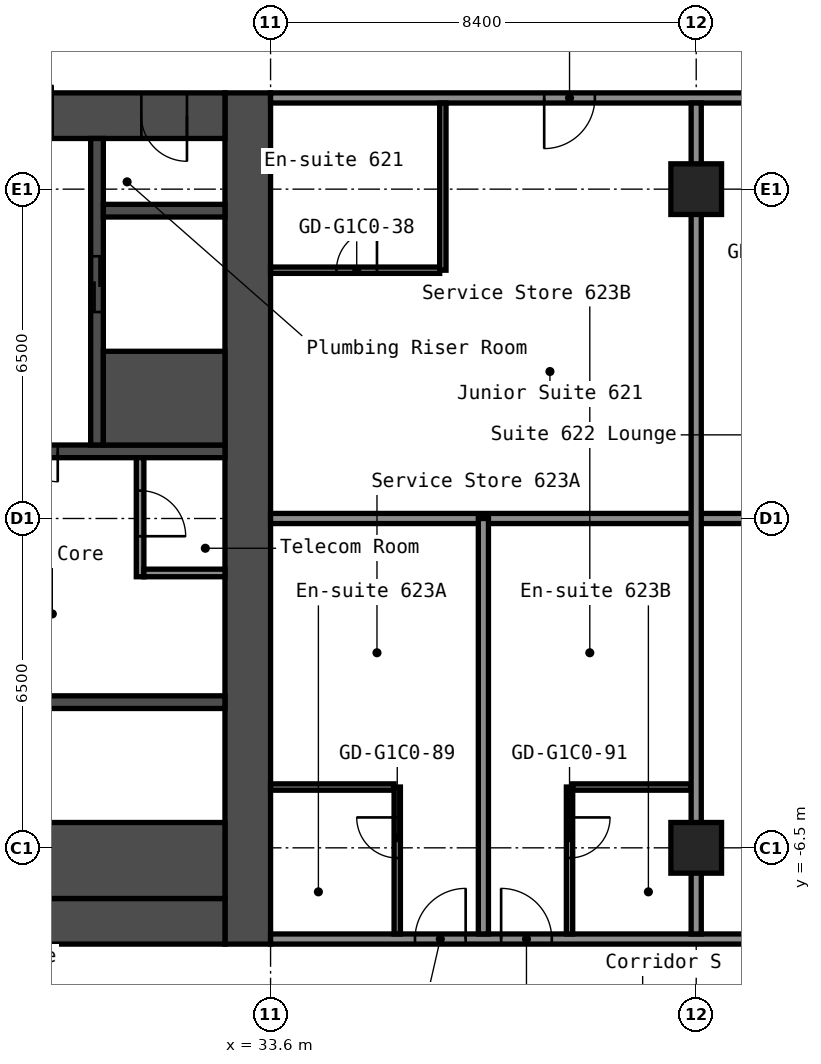
"""IFC4 building model, lengths in metres.
Left out: names, types, materials, properties, quantities, classifications, styles, units other than length and angle.
Written with IfcOpenShell. Run it as: python <this file> out.ifc"""

import sys

from ifc_helpers import new_model, si_unit, direction, frame, frame_2d, origin, origin_2d, place, context, subcontext, project, spatial, rectangle, hollow_rectangle, extrude, element, fill, save


model = new_model("IFC4")
c1 = context("Model", 3, precision=1e-05, world=origin(), true_north=direction((0.0, 1.0)))
c2 = subcontext(c1, "Body", "Model", "MODEL_VIEW")
j1 = project(units=[si_unit("LENGTHUNIT", "METRE"), si_unit("PLANEANGLEUNIT", "RADIAN")], contexts=[c1])
p1 = place(None, origin())
s1 = spatial("IfcSite", under=j1, at=p1, CompositionType="ELEMENT")
p2 = place(p1, origin())
s2 = spatial("IfcBuilding", under=s1, at=p2, CompositionType="ELEMENT")
p3 = place(p2, frame((0.0, 0.0, 26.2)))
s3 = spatial("IfcBuildingStorey", under=s2, at=p3, CompositionType="ELEMENT", Elevation=26.2)
for number, where, z_axis, x_axis in (
    (1, (42.0, -6.5, 0.0), (0.0, 0.0, 1.0), (1.0, 0.0, 0.0)),
    (2, (42.0, 6.5, 0.0), (0.0, 0.0, 1.0), (1.0, 0.0, 0.0)),
):
    element("IfcColumn", number, at=place(p3, frame(where, z_axis=z_axis, x_axis=x_axis)), inside=s3, PredefinedType="COLUMN", context=c2, shape_type="SweptSolid", body=[
        extrude(hollow_rectangle(XDim=1.0, YDim=1.0, WallThickness=0.04, at=origin_2d()), origin(), (0.0, 0.0, 1.0), 2.8),
    ])
p4 = place(p3, frame((33.15, -8.4, 0.0), z_axis=(0.0, 0.0, 1.0), x_axis=(0.0, 1.0, 0.0)))
e3 = element("IfcWall", 3, at=p4, inside=s3, PredefinedType="SHEAR", context=c2, shape_type="SweptSolid", body=[
    extrude(rectangle(XDim=16.8, YDim=0.9, at=frame_2d((8.4, 0.0))), origin(), (0.0, 0.0, 1.0), 2.8),
])
p5 = place(p3, frame((17.7, 7.95, 0.0), z_axis=(0.0, 0.0, 1.0), x_axis=(1.0, 0.0, 0.0)))
e4 = element("IfcWall", 4, at=p5, inside=s3, PredefinedType="SHEAR", context=c2, shape_type="SweptSolid", body=[
    extrude(rectangle(XDim=15.0, YDim=0.9, at=frame_2d((7.5, 0.0))), origin(), (0.0, 0.0, 1.0), 2.8),
])
p6 = place(p5, frame((10.4, 0.0, 0.0)))
e5 = element("IfcOpeningElement", 5, at=p6, cuts=e4, PredefinedType="OPENING", context=c2, shape_type="SweptSolid", body=[
    extrude(rectangle(XDim=1.2, YDim=2.1, at=frame_2d((0.6, 1.05))), frame((0.0, 0.46, 0.0), z_axis=(0.0, -1.0, 0.0), x_axis=(1.0, 0.0, 0.0)), (0.0, 0.0, 1.0), 0.92),
])
p7 = place(p5, frame((13.35, 0.0, 0.0)))
e6 = element("IfcOpeningElement", 6, at=p7, cuts=e4, PredefinedType="OPENING", context=c2, shape_type="SweptSolid", body=[
    extrude(rectangle(XDim=0.9, YDim=2.1, at=frame_2d((0.45, 1.05))), frame((0.0, 0.46, 0.0), z_axis=(0.0, -1.0, 0.0), x_axis=(1.0, 0.0, 0.0)), (0.0, 0.0, 1.0), 0.92),
])
p8 = place(p3, frame((17.7, -7.95, 0.0), z_axis=(0.0, 0.0, 1.0), x_axis=(1.0, 0.0, 0.0)))
e7 = element("IfcWall", 7, at=p8, inside=s3, PredefinedType="SHEAR", context=c2, shape_type="SweptSolid", body=[
    extrude(rectangle(XDim=15.0, YDim=0.9, at=frame_2d((7.5, 0.0))), origin(), (0.0, 0.0, 1.0), 2.8),
])
p9 = place(p8, frame((2.55, 0.0, 0.0)))
e8 = element("IfcOpeningElement", 8, at=p9, cuts=e7, PredefinedType="OPENING", context=c2, shape_type="SweptSolid", body=[
    extrude(rectangle(XDim=1.0, YDim=2.1, at=frame_2d((0.5, 1.05))), frame((0.0, 0.46, 0.0), z_axis=(0.0, -1.0, 0.0), x_axis=(1.0, 0.0, 0.0)), (0.0, 0.0, 1.0), 0.92),
])
p10 = place(p3, frame((27.65, 1.325, 0.0), z_axis=(0.0, 0.0, 1.0), x_axis=(1.0, 0.0, 0.0)))
e9 = element("IfcWall", 9, at=p10, inside=s3, PredefinedType="SHEAR", context=c2, shape_type="SweptSolid", body=[
    extrude(rectangle(XDim=5.05, YDim=0.25, at=frame_2d((2.525, 0.0))), origin(), (0.0, 0.0, 1.0), 2.8),
])
p11 = place(p10, frame((0.55, 0.0, 0.0)))
e10 = element("IfcOpeningElement", 10, at=p11, cuts=e9, PredefinedType="OPENING", context=c2, shape_type="SweptSolid", body=[
    extrude(rectangle(XDim=1.2, YDim=2.1, at=frame_2d((0.6, 1.05))), frame((0.0, 0.135, 0.0), z_axis=(0.0, -1.0, 0.0), x_axis=(1.0, 0.0, 0.0)), (0.0, 0.0, 1.0), 0.27),
])
p12 = place(p3, frame((30.175, 1.45, 0.0), z_axis=(0.0, 0.0, 1.0), x_axis=(0.0, 1.0, 0.0)))
e11 = element("IfcWall", 11, at=p12, inside=s3, PredefinedType="SHEAR", context=c2, shape_type="SweptSolid", body=[
    extrude(rectangle(XDim=6.05, YDim=0.25, at=frame_2d((3.025, 0.0))), origin(), (0.0, 0.0, 1.0), 2.8),
])
p13 = place(p12, frame((2.625, 0.0, 0.0)))
e12 = element("IfcOpeningElement", 12, at=p13, cuts=e11, PredefinedType="OPENING", context=c2, shape_type="SweptSolid", body=[
    extrude(rectangle(XDim=1.1, YDim=2.1, at=frame_2d((0.55, 1.05))), frame((0.0, 0.135, 0.0), z_axis=(0.0, -1.0, 0.0), x_axis=(1.0, 0.0, 0.0)), (0.0, 0.0, 1.0), 0.27),
])
p14 = place(p3, frame((30.3, 2.375, 0.0), z_axis=(0.0, 0.0, 1.0), x_axis=(1.0, 0.0, 0.0)))
e13 = element("IfcWall", 13, at=p14, inside=s3, PredefinedType="SHEAR", context=c2, shape_type="SweptSolid", body=[
    extrude(rectangle(XDim=2.4, YDim=1.85, at=frame_2d((1.2, 0.0))), origin(), (0.0, 0.0, 1.0), 2.8),
])
p15 = place(p3, frame((30.3, 6.075, 0.0), z_axis=(0.0, 0.0, 1.0), x_axis=(1.0, 0.0, 0.0)))
e14 = element("IfcWall", 14, at=p15, inside=s3, PredefinedType="SHEAR", context=c2, shape_type="SweptSolid", body=[
    extrude(rectangle(XDim=2.4, YDim=0.25, at=frame_2d((1.2, 0.0))), origin(), (0.0, 0.0, 1.0), 2.8),
])
p16 = place(p3, frame((28.15, -3.625, 0.0), z_axis=(0.0, 0.0, 1.0), x_axis=(1.0, 0.0, 0.0)))
e15 = element("IfcWall", 15, at=p16, inside=s3, PredefinedType="SHEAR", context=c2, shape_type="SweptSolid", body=[
    extrude(rectangle(XDim=4.55, YDim=0.25, at=frame_2d((2.275, 0.0))), origin(), (0.0, 0.0, 1.0), 2.8),
])
p17 = place(p3, frame((28.15, -6.75, 0.0), z_axis=(0.0, 0.0, 1.0), x_axis=(1.0, 0.0, 0.0)))
e16 = element("IfcWall", 16, at=p17, inside=s3, PredefinedType="SHEAR", context=c2, shape_type="SweptSolid", body=[
    extrude(rectangle(XDim=4.55, YDim=1.5, at=frame_2d((2.275, 0.0))), origin(), (0.0, 0.0, 1.0), 2.8),
])
p18 = place(p3, frame((31.025, -1.15, 0.0), z_axis=(0.0, 0.0, 1.0), x_axis=(0.0, 1.0, 0.0)))
e17 = element("IfcWall", 17, at=p18, inside=s3, PredefinedType="PARTITIONING", context=c2, shape_type="SweptSolid", body=[
    extrude(rectangle(XDim=2.35, YDim=0.15, at=frame_2d((1.175, 0.0))), origin(), (0.0, 0.0, 1.0), 2.8),
])
p19 = place(p18, frame((0.8, 0.0, 0.0)))
e18 = element("IfcOpeningElement", 18, at=p19, cuts=e17, PredefinedType="OPENING", context=c2, shape_type="SweptSolid", body=[
    extrude(rectangle(XDim=0.9, YDim=2.1, at=frame_2d((0.45, 1.05))), frame((0.0, 0.085, 0.0), z_axis=(0.0, -1.0, 0.0), x_axis=(1.0, 0.0, 0.0)), (0.0, 0.0, 1.0), 0.17),
])
p20 = place(p3, frame((31.1, -1.075, 0.0), z_axis=(0.0, 0.0, 1.0), x_axis=(1.0, 0.0, 0.0)))
e19 = element("IfcWall", 19, at=p20, inside=s3, PredefinedType="PARTITIONING", context=c2, shape_type="SweptSolid", body=[
    extrude(rectangle(XDim=1.6, YDim=0.15, at=frame_2d((0.8, 0.0))), origin(), (0.0, 0.0, 1.0), 2.8),
])
p21 = place(p3, frame((33.6, -8.3, 0.0), z_axis=(0.0, 0.0, 1.0), x_axis=(1.0, 0.0, 0.0)))
e20 = element("IfcWall", 20, at=p21, inside=s3, PredefinedType="PARTITIONING", context=c2, shape_type="SweptSolid", body=[
    extrude(rectangle(XDim=15.0, YDim=0.2, at=frame_2d((7.5, 0.0))), origin(), (0.0, 0.0, 1.0), 2.8),
])
p22 = place(p21, frame((2.85, 0.0, 0.0)))
e21 = element("IfcOpeningElement", 21, at=p22, cuts=e20, PredefinedType="OPENING", context=c2, shape_type="SweptSolid", body=[
    extrude(rectangle(XDim=1.0, YDim=2.1, at=frame_2d((0.5, 1.05))), frame((0.0, 0.11, 0.0), z_axis=(0.0, -1.0, 0.0), x_axis=(1.0, 0.0, 0.0)), (0.0, 0.0, 1.0), 0.22),
])
p23 = place(p21, frame((4.55, 0.0, 0.0)))
e22 = element("IfcOpeningElement", 22, at=p23, cuts=e20, PredefinedType="OPENING", context=c2, shape_type="SweptSolid", body=[
    extrude(rectangle(XDim=1.0, YDim=2.1, at=frame_2d((0.5, 1.05))), frame((0.0, 0.11, 0.0), z_axis=(0.0, -1.0, 0.0), x_axis=(1.0, 0.0, 0.0)), (0.0, 0.0, 1.0), 0.22),
])
p24 = place(p21, frame((9.55, 0.0, 0.0)))
e23 = element("IfcOpeningElement", 23, at=p24, cuts=e20, PredefinedType="OPENING", context=c2, shape_type="SweptSolid", body=[
    extrude(rectangle(XDim=1.0, YDim=2.1, at=frame_2d((0.5, 1.05))), frame((0.0, 0.11, 0.0), z_axis=(0.0, -1.0, 0.0), x_axis=(1.0, 0.0, 0.0)), (0.0, 0.0, 1.0), 0.22),
])
p25 = place(p3, frame((33.6, -5.3, 0.0), z_axis=(0.0, 0.0, 1.0), x_axis=(1.0, 0.0, 0.0)))
e24 = element("IfcWall", 24, at=p25, inside=s3, PredefinedType="PARTITIONING", context=c2, shape_type="SweptSolid", body=[
    extrude(rectangle(XDim=2.438, YDim=0.125, at=frame_2d((1.219, 0.0))), origin(), (0.0, 0.0, 1.0), 2.8),
])
p26 = place(p3, frame((39.562, -5.3, 0.0), z_axis=(0.0, 0.0, 1.0), x_axis=(1.0, 0.0, 0.0)))
e25 = element("IfcWall", 25, at=p26, inside=s3, PredefinedType="PARTITIONING", context=c2, shape_type="SweptSolid", body=[
    extrude(rectangle(XDim=2.337, YDim=0.125, at=frame_2d((1.169, 0.0))), origin(), (0.0, 0.0, 1.0), 2.8),
])
p27 = place(p3, frame((33.6, 0.0, 0.0), z_axis=(0.0, 0.0, 1.0), x_axis=(1.0, 0.0, 0.0)))
e26 = element("IfcWall", 26, at=p27, inside=s3, PredefinedType="PARTITIONING", context=c2, shape_type="SweptSolid", body=[
    extrude(rectangle(XDim=14.9, YDim=0.2, at=frame_2d((7.45, 0.0))), origin(), (0.0, 0.0, 1.0), 2.8),
])
p28 = place(p3, frame((33.6, 4.9, 0.0), z_axis=(0.0, 0.0, 1.0), x_axis=(1.0, 0.0, 0.0)))
e27 = element("IfcWall", 27, at=p28, inside=s3, PredefinedType="PARTITIONING", context=c2, shape_type="SweptSolid", body=[
    extrude(rectangle(XDim=3.337, YDim=0.125, at=frame_2d((1.669, 0.0))), origin(), (0.0, 0.0, 1.0), 2.8),
])
p29 = place(p28, frame((1.3, 0.0, 0.0)))
e28 = element("IfcOpeningElement", 28, at=p29, cuts=e27, PredefinedType="OPENING", context=c2, shape_type="SweptSolid", body=[
    extrude(rectangle(XDim=0.8, YDim=2.1, at=frame_2d((0.4, 1.05))), frame((0.0, 0.073, 0.0), z_axis=(0.0, -1.0, 0.0), x_axis=(1.0, 0.0, 0.0)), (0.0, 0.0, 1.0), 0.145),
])
p30 = place(p3, frame((33.6, 8.3, 0.0), z_axis=(0.0, 0.0, 1.0), x_axis=(1.0, 0.0, 0.0)))
e29 = element("IfcWall", 29, at=p30, inside=s3, PredefinedType="PARTITIONING", context=c2, shape_type="SweptSolid", body=[
    extrude(rectangle(XDim=15.0, YDim=0.2, at=frame_2d((7.5, 0.0))), origin(), (0.0, 0.0, 1.0), 2.8),
])
p31 = place(p30, frame((5.4, 0.0, 0.0)))
e30 = element("IfcOpeningElement", 30, at=p31, cuts=e29, PredefinedType="OPENING", context=c2, shape_type="SweptSolid", body=[
    extrude(rectangle(XDim=1.0, YDim=2.1, at=frame_2d((0.5, 1.05))), frame((0.0, 0.11, 0.0), z_axis=(0.0, -1.0, 0.0), x_axis=(1.0, 0.0, 0.0)), (0.0, 0.0, 1.0), 0.22),
])
p32 = place(p30, frame((9.55, 0.0, 0.0)))
e31 = element("IfcOpeningElement", 31, at=p32, cuts=e29, PredefinedType="OPENING", context=c2, shape_type="SweptSolid", body=[
    extrude(rectangle(XDim=1.0, YDim=2.1, at=frame_2d((0.5, 1.05))), frame((0.0, 0.11, 0.0), z_axis=(0.0, -1.0, 0.0), x_axis=(1.0, 0.0, 0.0)), (0.0, 0.0, 1.0), 0.22),
])
p33 = place(p3, frame((36.1, -8.2, 0.0), z_axis=(0.0, 0.0, 1.0), x_axis=(0.0, 1.0, 0.0)))
e32 = element("IfcWall", 32, at=p33, inside=s3, PredefinedType="PARTITIONING", context=c2, shape_type="SweptSolid", body=[
    extrude(rectangle(XDim=2.9, YDim=0.125, at=frame_2d((1.45, 0.0))), origin(), (0.0, 0.0, 1.0), 2.8),
])
p34 = place(p33, frame((1.5, 0.0, 0.0)))
e33 = element("IfcOpeningElement", 33, at=p34, cuts=e32, PredefinedType="OPENING", context=c2, shape_type="SweptSolid", body=[
    extrude(rectangle(XDim=0.8, YDim=2.1, at=frame_2d((0.4, 1.05))), frame((0.0, 0.073, 0.0), z_axis=(0.0, -1.0, 0.0), x_axis=(1.0, 0.0, 0.0)), (0.0, 0.0, 1.0), 0.145),
])
p35 = place(p3, frame((37.0, 4.9, 0.0), z_axis=(0.0, 0.0, 1.0), x_axis=(0.0, 1.0, 0.0)))
e34 = element("IfcWall", 34, at=p35, inside=s3, PredefinedType="PARTITIONING", context=c2, shape_type="SweptSolid", body=[
    extrude(rectangle(XDim=3.3, YDim=0.125, at=frame_2d((1.65, 0.0))), origin(), (0.0, 0.0, 1.0), 2.8),
])
p36 = place(p3, frame((37.8, -8.2, 0.0), z_axis=(0.0, 0.0, 1.0), x_axis=(0.0, 1.0, 0.0)))
e35 = element("IfcWall", 35, at=p36, inside=s3, PredefinedType="PARTITIONING", context=c2, shape_type="SweptSolid", body=[
    extrude(rectangle(XDim=8.2, YDim=0.2, at=frame_2d((4.1, 0.0))), origin(), (0.0, 0.0, 1.0), 2.8),
])
p37 = place(p3, frame((39.5, -8.2, 0.0), z_axis=(0.0, 0.0, 1.0), x_axis=(0.0, 1.0, 0.0)))
e36 = element("IfcWall", 36, at=p37, inside=s3, PredefinedType="PARTITIONING", context=c2, shape_type="SweptSolid", body=[
    extrude(rectangle(XDim=2.9, YDim=0.125, at=frame_2d((1.45, 0.0))), origin(), (0.0, 0.0, 1.0), 2.8),
])
p38 = place(p37, frame((1.5, 0.0, 0.0)))
e37 = element("IfcOpeningElement", 37, at=p38, cuts=e36, PredefinedType="OPENING", context=c2, shape_type="SweptSolid", body=[
    extrude(rectangle(XDim=0.8, YDim=2.1, at=frame_2d((0.4, 1.05))), frame((0.0, 0.073, 0.0), z_axis=(0.0, -1.0, 0.0), x_axis=(1.0, 0.0, 0.0)), (0.0, 0.0, 1.0), 0.145),
])
p39 = place(p3, frame((42.0, -8.2, 0.0), z_axis=(0.0, 0.0, 1.0), x_axis=(0.0, 1.0, 0.0)))
e38 = element("IfcWall", 38, at=p39, inside=s3, PredefinedType="PARTITIONING", context=c2, shape_type="SweptSolid", body=[
    extrude(rectangle(XDim=16.4, YDim=0.2, at=frame_2d((8.2, 0.0))), origin(), (0.0, 0.0, 1.0), 2.8),
])
p40 = place(p7, origin())
e39 = element("IfcDoor", 39, at=p40, inside=s3, OperationType="SINGLE_SWING_RIGHT", PredefinedType="DOOR", context=c2, shape_type="SweptSolid", body=[
    extrude(rectangle(XDim=0.9, YDim=2.1, at=frame_2d((0.45, 1.05))), frame((0.0, 0.025, 0.0), z_axis=(0.0, -1.0, 0.0), x_axis=(1.0, 0.0, 0.0)), (0.0, 0.0, 1.0), 0.05),
])
fill(e6, e39)
p41 = place(p11, origin())
e40 = element("IfcDoor", 40, at=p41, inside=s3, OperationType="DOUBLE_DOOR_SINGLE_SWING", PredefinedType="DOOR", context=c2, shape_type="SweptSolid", body=[
    extrude(rectangle(XDim=1.2, YDim=2.1, at=frame_2d((0.6, 1.05))), frame((0.0, 0.025, 0.0), z_axis=(0.0, -1.0, 0.0), x_axis=(1.0, 0.0, 0.0)), (0.0, 0.0, 1.0), 0.05),
])
fill(e10, e40)
p42 = place(p19, origin())
e41 = element("IfcDoor", 41, at=p42, inside=s3, OperationType="SINGLE_SWING_LEFT", PredefinedType="DOOR", context=c2, shape_type="SweptSolid", body=[
    extrude(rectangle(XDim=0.9, YDim=2.1, at=frame_2d((0.45, 1.05))), frame((0.0, 0.025, 0.0), z_axis=(0.0, -1.0, 0.0), x_axis=(1.0, 0.0, 0.0)), (0.0, 0.0, 1.0), 0.05),
])
fill(e18, e41)
p43 = place(p13, origin())
e42 = element("IfcDoor", 42, at=p43, inside=s3, OperationType="DOUBLE_DOOR_SLIDING", PredefinedType="DOOR", context=c2, shape_type="SweptSolid", body=[
    extrude(rectangle(XDim=1.1, YDim=2.1, at=frame_2d((0.55, 1.05))), frame((0.0, 0.025, 0.0), z_axis=(0.0, -1.0, 0.0), x_axis=(1.0, 0.0, 0.0)), (0.0, 0.0, 1.0), 0.05),
])
fill(e12, e42)
p44 = place(p22, origin())
e43 = element("IfcDoor", 43, at=p44, inside=s3, OperationType="SINGLE_SWING_LEFT", PredefinedType="DOOR", context=c2, shape_type="SweptSolid", body=[
    extrude(rectangle(XDim=1.0, YDim=2.1, at=frame_2d((0.5, 1.05))), frame((0.0, 0.025, 0.0), z_axis=(0.0, -1.0, 0.0), x_axis=(1.0, 0.0, 0.0)), (0.0, 0.0, 1.0), 0.05),
])
fill(e21, e43)
p45 = place(p23, origin())
e44 = element("IfcDoor", 44, at=p45, inside=s3, OperationType="SINGLE_SWING_RIGHT", PredefinedType="DOOR", context=c2, shape_type="SweptSolid", body=[
    extrude(rectangle(XDim=1.0, YDim=2.1, at=frame_2d((0.5, 1.05))), frame((0.0, 0.025, 0.0), z_axis=(0.0, -1.0, 0.0), x_axis=(1.0, 0.0, 0.0)), (0.0, 0.0, 1.0), 0.05),
])
fill(e22, e44)
p46 = place(p29, origin())
e45 = element("IfcDoor", 45, at=p46, inside=s3, OperationType="SINGLE_SWING_LEFT", PredefinedType="DOOR", context=c2, shape_type="SweptSolid", body=[
    extrude(rectangle(XDim=0.8, YDim=2.1, at=frame_2d((0.4, 1.05))), frame((0.0, 0.025, 0.0), z_axis=(0.0, -1.0, 0.0), x_axis=(1.0, 0.0, 0.0)), (0.0, 0.0, 1.0), 0.05),
])
fill(e28, e45)
p47 = place(p31, origin())
e46 = element("IfcDoor", 46, at=p47, inside=s3, OperationType="SINGLE_SWING_LEFT", PredefinedType="DOOR", context=c2, shape_type="SweptSolid", body=[
    extrude(rectangle(XDim=1.0, YDim=2.1, at=frame_2d((0.5, 1.05))), frame((0.0, 0.025, 0.0), z_axis=(0.0, -1.0, 0.0), x_axis=(1.0, 0.0, 0.0)), (0.0, 0.0, 1.0), 0.05),
])
fill(e30, e46)
p48 = place(p34, origin())
e47 = element("IfcDoor", 47, at=p48, inside=s3, OperationType="SINGLE_SWING_LEFT", PredefinedType="DOOR", context=c2, shape_type="SweptSolid", body=[
    extrude(rectangle(XDim=0.8, YDim=2.1, at=frame_2d((0.4, 1.05))), frame((0.0, 0.025, 0.0), z_axis=(0.0, -1.0, 0.0), x_axis=(1.0, 0.0, 0.0)), (0.0, 0.0, 1.0), 0.05),
])
fill(e33, e47)
p49 = place(p38, origin())
e48 = element("IfcDoor", 48, at=p49, inside=s3, OperationType="SINGLE_SWING_RIGHT", PredefinedType="DOOR", context=c2, shape_type="SweptSolid", body=[
    extrude(rectangle(XDim=0.8, YDim=2.1, at=frame_2d((0.4, 1.05))), frame((0.0, 0.025, 0.0), z_axis=(0.0, -1.0, 0.0), x_axis=(1.0, 0.0, 0.0)), (0.0, 0.0, 1.0), 0.05),
])
fill(e37, e48)
save(model, sys.argv[1])
